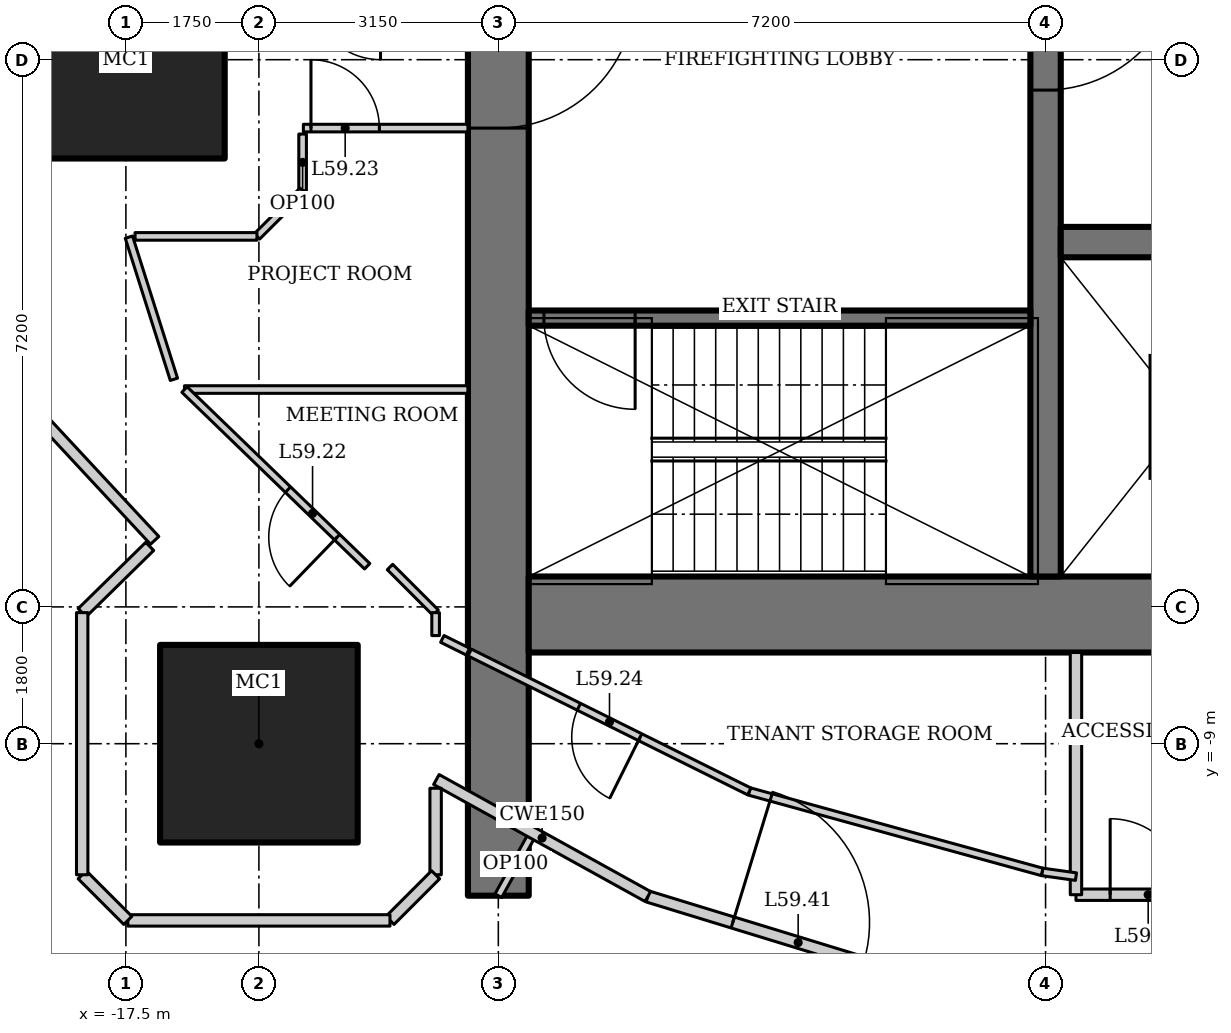
"""IFC4 building model, lengths in metres.
Left out: names, types, materials, properties, quantities, classifications, styles, units other than length and angle.
Written with IfcOpenShell. Run it as: python <this file> out.ifc"""

import sys

from ifc_helpers import new_model, si_unit, direction, frame, frame_2d, origin, origin_2d, place, context, subcontext, project, spatial, rectangle, hollow_rectangle, extrude, element, fill, save


model = new_model("IFC4")
c1 = context("Model", 3, precision=1e-05, world=origin(), true_north=direction((0.0, 1.0)))
c2 = subcontext(c1, "Body", "Model", "MODEL_VIEW")
j1 = project(units=[si_unit("LENGTHUNIT", "METRE"), si_unit("PLANEANGLEUNIT", "RADIAN")], contexts=[c1])
p1 = place(None, origin())
s1 = spatial("IfcSite", under=j1, at=p1, CompositionType="ELEMENT")
p2 = place(p1, origin())
s2 = spatial("IfcBuilding", under=s1, at=p2, CompositionType="ELEMENT")
p3 = place(p2, frame((0.0, 0.0, 253.6)))
s3 = spatial("IfcBuildingStorey", under=s2, at=p3, CompositionType="ELEMENT", Elevation=253.6)
for number, where, z_axis, x_axis in (
    (1, (-17.5, 0.0, 0.0), (0.0, 0.0, 1.0), (1.0, 0.0, 0.0)),
    (2, (-15.75, -9.0, 0.0), (0.0, 0.0, 1.0), (1.0, 0.0, 0.0)),
):
    element("IfcColumn", number, at=place(p3, frame(where, z_axis=z_axis, x_axis=x_axis)), inside=s3, PredefinedType="COLUMN", context=c2, shape_type="SweptSolid", body=[
        extrude(hollow_rectangle(XDim=2.6, YDim=2.6, WallThickness=0.13, at=origin_2d()), origin(), (0.0, 0.0, 1.0), 4.2),
    ])
p4 = place(p3, frame((-12.6, 11.0, 0.0), z_axis=(0.0, 0.0, 1.0), x_axis=(0.0, -1.0, 0.0)))
e3 = element("IfcWall", 3, at=p4, inside=s3, PredefinedType="SHEAR", context=c2, shape_type="SweptSolid", body=[
    extrude(rectangle(XDim=22.0, YDim=0.8, at=frame_2d((11.0, 0.0))), origin(), (0.0, 0.0, 1.0), 4.2),
])
p5 = place(p4, frame((10.1, 0.0, 0.0)))
e4 = element("IfcOpeningElement", 4, at=p5, cuts=e3, PredefinedType="OPENING", context=c2, shape_type="SweptSolid", body=[
    extrude(rectangle(XDim=1.8, YDim=2.1, at=frame_2d((0.9, 1.05))), frame((0.0, 0.41, 0.0), z_axis=(0.0, -1.0, 0.0), x_axis=(1.0, 0.0, 0.0)), (0.0, 0.0, 1.0), 0.82),
])
p6 = place(p3, frame((-12.2, -7.3, 0.0), z_axis=(0.0, 0.0, 1.0), x_axis=(1.0, 0.0, 0.0)))
e5 = element("IfcWall", 5, at=p6, inside=s3, PredefinedType="SHEAR", context=c2, shape_type="SweptSolid", body=[
    extrude(rectangle(XDim=24.4, YDim=1.0, at=frame_2d((12.2, 0.0))), origin(), (0.0, 0.0, 1.0), 4.2),
])
p7 = place(p3, frame((-5.4, 7.8, 0.0), z_axis=(0.0, 0.0, 1.0), x_axis=(0.0, -1.0, 0.0)))
e6 = element("IfcWall", 6, at=p7, inside=s3, PredefinedType="SHEAR", context=c2, shape_type="SweptSolid", body=[
    extrude(rectangle(XDim=14.6, YDim=0.4, at=frame_2d((7.3, 0.0))), origin(), (0.0, 0.0, 1.0), 4.2),
])
p8 = place(p7, frame((6.4, 0.0, 0.0)))
e7 = element("IfcOpeningElement", 7, at=p8, cuts=e6, PredefinedType="OPENING", context=c2, shape_type="SweptSolid", body=[
    extrude(rectangle(XDim=1.8, YDim=2.1, at=frame_2d((0.9, 1.05))), frame((0.0, 0.21, 0.0), z_axis=(0.0, -1.0, 0.0), x_axis=(1.0, 0.0, 0.0)), (0.0, 0.0, 1.0), 0.42),
])
p9 = place(p3, frame((-5.2, -2.4, 0.0), z_axis=(0.0, 0.0, 1.0), x_axis=(1.0, 0.0, 0.0)))
e8 = element("IfcWall", 8, at=p9, inside=s3, PredefinedType="SHEAR", context=c2, shape_type="SweptSolid", body=[
    extrude(rectangle(XDim=10.4, YDim=0.4, at=frame_2d((5.2, 0.0))), origin(), (0.0, 0.0, 1.0), 4.2),
])
p10 = place(p9, frame((1.683, 0.0, 0.0)))
e9 = element("IfcOpeningElement", 9, at=p10, cuts=e8, PredefinedType="OPENING", context=c2, shape_type="SweptSolid", body=[
    extrude(rectangle(XDim=1.1, YDim=2.2, at=frame_2d((0.55, 1.1))), frame((0.0, 0.21, 0.0), z_axis=(0.0, -1.0, 0.0), x_axis=(1.0, 0.0, 0.0)), (0.0, 0.0, 1.0), 0.42),
])
p11 = place(p9, frame((5.217, 0.0, 0.0)))
e10 = element("IfcOpeningElement", 10, at=p11, cuts=e8, PredefinedType="OPENING", context=c2, shape_type="SweptSolid", body=[
    extrude(rectangle(XDim=1.1, YDim=2.2, at=frame_2d((0.55, 1.1))), frame((0.0, 0.21, 0.0), z_axis=(0.0, -1.0, 0.0), x_axis=(1.0, 0.0, 0.0)), (0.0, 0.0, 1.0), 0.42),
])
p12 = place(p9, frame((8.75, 0.0, 0.0)))
e11 = element("IfcOpeningElement", 11, at=p12, cuts=e8, PredefinedType="OPENING", context=c2, shape_type="SweptSolid", body=[
    extrude(rectangle(XDim=1.1, YDim=2.2, at=frame_2d((0.55, 1.1))), frame((0.0, 0.21, 0.0), z_axis=(0.0, -1.0, 0.0), x_axis=(1.0, 0.0, 0.0)), (0.0, 0.0, 1.0), 0.42),
])
p13 = place(p3, frame((-5.6, -3.4, 0.0), z_axis=(0.0, 0.0, 1.0), x_axis=(-1.0, 0.0, 0.0)))
e12 = element("IfcWall", 12, at=p13, inside=s3, PredefinedType="SHEAR", context=c2, shape_type="SweptSolid", body=[
    extrude(rectangle(XDim=6.6, YDim=0.2, at=frame_2d((3.3, 0.0))), origin(), (0.0, 0.0, 1.0), 4.2),
])
p14 = place(p13, frame((5.2, 0.0, 0.0)))
e13 = element("IfcOpeningElement", 13, at=p14, cuts=e12, PredefinedType="OPENING", context=c2, shape_type="SweptSolid", body=[
    extrude(rectangle(XDim=1.2, YDim=2.1, at=frame_2d((0.6, 1.05))), frame((0.0, 0.11, 0.0), z_axis=(0.0, -1.0, 0.0), x_axis=(1.0, 0.0, 0.0)), (0.0, 0.0, 1.0), 0.22),
])
p15 = place(p3, frame((-10.633, -11.01, 0.0), z_axis=(0.0, 0.0, 1.0), x_axis=(0.956185837153, -0.292760388079, 0.0)))
e14 = element("IfcWall", 14, at=p15, inside=s3, PredefinedType="PARTITIONING", context=c2, shape_type="SweptSolid", body=[
    extrude(rectangle(XDim=4.544, YDim=0.15, at=frame_2d((2.272, 0.0))), origin(), (0.0, 0.0, 1.0), 4.05),
])
p16 = place(p15, frame((1.168, 0.0, 0.0)))
e15 = element("IfcOpeningElement", 15, at=p16, cuts=e14, PredefinedType="OPENING", context=c2, shape_type="SweptSolid", body=[
    extrude(rectangle(XDim=1.8, YDim=2.1, at=frame_2d((0.9, 1.05))), frame((0.0, 0.085, 0.0), z_axis=(0.0, -1.0, 0.0), x_axis=(1.0, 0.0, 0.0)), (0.0, 0.0, 1.0), 0.17),
])
p17 = place(p3, frame((-5.0, -10.987, 0.0), z_axis=(0.0, 0.0, 1.0), x_axis=(1.0, 0.0, 0.0)))
e16 = element("IfcWall", 16, at=p17, inside=s3, PredefinedType="SOLIDWALL", context=c2, shape_type="SweptSolid", body=[
    extrude(rectangle(XDim=10.0, YDim=0.15, at=frame_2d((5.0, 0.0))), origin(), (0.0, 0.0, 1.0), 4.05),
])
p18 = place(p17, frame((0.45, 0.0, 0.0)))
e17 = element("IfcOpeningElement", 17, at=p18, cuts=e16, PredefinedType="OPENING", context=c2, shape_type="SweptSolid", body=[
    extrude(rectangle(XDim=1.0, YDim=2.1, at=frame_2d((0.5, 1.05))), frame((0.0, 0.085, 0.0), z_axis=(0.0, -1.0, 0.0), x_axis=(1.0, 0.0, 0.0)), (0.0, 0.0, 1.0), 0.17),
])
p19 = place(p17, frame((3.15, 0.0, 0.0)))
e18 = element("IfcOpeningElement", 18, at=p19, cuts=e16, PredefinedType="OPENING", context=c2, shape_type="SweptSolid", body=[
    extrude(rectangle(XDim=0.9, YDim=2.1, at=frame_2d((0.45, 1.05))), frame((0.0, 0.085, 0.0), z_axis=(0.0, -1.0, 0.0), x_axis=(1.0, 0.0, 0.0)), (0.0, 0.0, 1.0), 0.17),
])
p20 = place(p17, frame((6.55, 0.0, 0.0)))
e19 = element("IfcOpeningElement", 19, at=p20, cuts=e16, PredefinedType="OPENING", context=c2, shape_type="SweptSolid", body=[
    extrude(rectangle(XDim=0.9, YDim=2.1, at=frame_2d((0.45, 1.05))), frame((0.0, 0.085, 0.0), z_axis=(0.0, -1.0, 0.0), x_axis=(1.0, 0.0, 0.0)), (0.0, 0.0, 1.0), 0.17),
])
p21 = place(p17, frame((8.95, 0.0, 0.0)))
e20 = element("IfcOpeningElement", 20, at=p21, cuts=e16, PredefinedType="OPENING", context=c2, shape_type="SweptSolid", body=[
    extrude(rectangle(XDim=0.8, YDim=2.1, at=frame_2d((0.4, 1.05))), frame((0.0, 0.085, 0.0), z_axis=(0.0, -1.0, 0.0), x_axis=(1.0, 0.0, 0.0)), (0.0, 0.0, 1.0), 0.17),
])
p22 = place(p3, frame((-5.0, -7.8, 0.0), z_axis=(0.0, 0.0, 1.0), x_axis=(0.0, -1.0, 0.0)))
e21 = element("IfcWall", 21, at=p22, inside=s3, PredefinedType="SOLIDWALL", context=c2, shape_type="SweptSolid", body=[
    extrude(rectangle(XDim=3.187, YDim=0.15, at=frame_2d((1.594, 0.0))), origin(), (0.0, 0.0, 1.0), 4.05),
])
p23 = place(p3, frame((-16.729, -4.34, 0.0), z_axis=(0.0, 0.0, 1.0), x_axis=(1.0, 0.0, 0.0)))
e22 = element("IfcWall", 22, at=p23, inside=s3, PredefinedType="PARTITIONING", context=c2, shape_type="SweptSolid", body=[
    extrude(rectangle(XDim=3.729, YDim=0.1, at=frame_2d((1.865, 0.0))), origin(), (0.0, 0.0, 1.0), 4.05),
])
p24 = place(p3, frame((-13.0, -7.788, 0.0), z_axis=(0.0, 0.0, 1.0), x_axis=(-0.895721570004, 0.444615416995, 0.0)))
e23 = element("IfcWall", 23, at=p24, inside=s3, PredefinedType="PARTITIONING", context=c2, shape_type="SweptSolid", body=[
    extrude(rectangle(XDim=0.376, YDim=0.1, at=frame_2d((0.188, 0.0))), origin(), (0.0, 0.0, 1.0), 4.05),
])
p25 = place(p3, frame((-5.0, -10.749, 0.0), z_axis=(0.0, 0.0, 1.0), x_axis=(-0.990442882696, 0.137923515463, 0.0)))
e24 = element("IfcWall", 24, at=p25, inside=s3, PredefinedType="PARTITIONING", context=c2, shape_type="SweptSolid", body=[
    extrude(rectangle(XDim=0.45, YDim=0.1, at=frame_2d((0.225, 0.0))), origin(), (0.0, 0.0, 1.0), 4.05),
])
p26 = place(p3, frame((-5.445, -10.687, 0.0), z_axis=(0.0, 0.0, 1.0), x_axis=(-0.964244438722, 0.265014456954, 0.0)))
e25 = element("IfcWall", 25, at=p26, inside=s3, PredefinedType="PARTITIONING", context=c2, shape_type="SweptSolid", body=[
    extrude(rectangle(XDim=3.995, YDim=0.1, at=frame_2d((1.998, 0.0))), origin(), (0.0, 0.0, 1.0), 4.05),
])
p27 = place(p3, frame((-9.298, -9.628, 0.0), z_axis=(0.0, 0.0, 1.0), x_axis=(-0.895529831139, 0.445001484874, 0.0)))
e26 = element("IfcWall", 26, at=p27, inside=s3, PredefinedType="PARTITIONING", context=c2, shape_type="SweptSolid", body=[
    extrude(rectangle(XDim=4.108, YDim=0.1, at=frame_2d((2.054, 0.0))), origin(), (0.0, 0.0, 1.0), 4.05),
])
p28 = place(p27, frame((1.604, 0.0, 0.0)))
e27 = element("IfcOpeningElement", 27, at=p28, cuts=e26, PredefinedType="OPENING", context=c2, shape_type="SweptSolid", body=[
    extrude(rectangle(XDim=0.9, YDim=2.1, at=frame_2d((0.45, 1.05))), frame((0.0, 0.06, 0.0), z_axis=(0.0, -1.0, 0.0), x_axis=(1.0, 0.0, 0.0)), (0.0, 0.0, 1.0), 0.12),
])
p29 = place(p3, frame((-12.6, -11.0, 0.0), z_axis=(0.0, 0.0, 1.0), x_axis=(0.484103558985, 0.875010710893, 0.0)))
e28 = element("IfcWall", 28, at=p29, inside=s3, PredefinedType="PARTITIONING", context=c2, shape_type="SweptSolid", body=[
    extrude(rectangle(XDim=0.943, YDim=0.1, at=frame_2d((0.472, 0.0))), origin(), (0.0, 0.0, 1.0), 4.05),
])
p30 = place(p3, frame((-16.868, -4.206, 0.0), z_axis=(0.0, 0.0, 1.0), x_axis=(-0.301821975729, 0.953364303384, 0.0)))
e29 = element("IfcWall", 29, at=p30, inside=s3, PredefinedType="PARTITIONING", context=c2, shape_type="SweptSolid", body=[
    extrude(rectangle(XDim=1.962, YDim=0.1, at=frame_2d((0.981, 0.0))), origin(), (0.0, 0.0, 1.0), 4.05),
])
p31 = place(p3, frame((-15.165, -0.9, 0.0), z_axis=(0.0, 0.0, 1.0), x_axis=(1.0, 0.0, 0.0)))
e30 = element("IfcWall", 30, at=p31, inside=s3, PredefinedType="PARTITIONING", context=c2, shape_type="SweptSolid", body=[
    extrude(rectangle(XDim=2.165, YDim=0.1, at=frame_2d((1.083, 0.0))), origin(), (0.0, 0.0, 1.0), 4.05),
])
p32 = place(p31, frame((0.1, 0.0, 0.0)))
e31 = element("IfcOpeningElement", 31, at=p32, cuts=e30, PredefinedType="OPENING", context=c2, shape_type="SweptSolid", body=[
    extrude(rectangle(XDim=0.9, YDim=2.1, at=frame_2d((0.45, 1.05))), frame((0.0, 0.06, 0.0), z_axis=(0.0, -1.0, 0.0), x_axis=(1.0, 0.0, 0.0)), (0.0, 0.0, 1.0), 0.12),
])
p33 = place(p3, frame((-15.175, -0.978, 0.0), z_axis=(0.0, 0.0, 1.0), x_axis=(0.0, -1.0, 0.0)))
e32 = element("IfcWall", 32, at=p33, inside=s3, PredefinedType="PARTITIONING", context=c2, shape_type="SweptSolid", body=[
    extrude(rectangle(XDim=0.746, YDim=0.1, at=frame_2d((0.373, 0.0))), origin(), (0.0, 0.0, 1.0), 4.05),
])
p34 = place(p3, frame((-15.175, -1.725, 0.0), z_axis=(0.0, 0.0, 1.0), x_axis=(-0.707106781187, -0.707106781187, 0.0)))
e33 = element("IfcWall", 33, at=p34, inside=s3, PredefinedType="PARTITIONING", context=c2, shape_type="SweptSolid", body=[
    extrude(rectangle(XDim=0.849, YDim=0.1, at=frame_2d((0.425, 0.0))), origin(), (0.0, 0.0, 1.0), 4.05),
])
p35 = place(p3, frame((-15.775, -2.325, 0.0), z_axis=(0.0, 0.0, 1.0), x_axis=(-1.0, 0.0, 0.0)))
e34 = element("IfcWall", 34, at=p35, inside=s3, PredefinedType="PARTITIONING", context=c2, shape_type="SweptSolid", body=[
    extrude(rectangle(XDim=1.604, YDim=0.1, at=frame_2d((0.802, 0.0))), origin(), (0.0, 0.0, 1.0), 4.05),
])
p36 = place(p3, frame((-18.673, -4.656, 0.0), z_axis=(0.0, 0.0, 1.0), x_axis=(0.680985069419, -0.732297299755, 0.0)))
e35 = element("IfcWall", 35, at=p36, inside=s3, PredefinedType="PARTITIONING", context=c2, shape_type="SweptSolid", body=[
    extrude(rectangle(XDim=2.279, YDim=0.15, at=frame_2d((1.14, 0.0))), origin(), (0.0, 0.0, 1.0), 4.05),
])
p37 = place(p3, frame((-13.415, -9.472, 0.0), z_axis=(0.0, 0.0, 1.0), x_axis=(0.875072100837, -0.483992580869, 0.0)))
e36 = element("IfcWall", 36, at=p37, inside=s3, PredefinedType="PARTITIONING", context=c2, shape_type="SweptSolid", body=[
    extrude(rectangle(XDim=3.179, YDim=0.15, at=frame_2d((1.59, 0.0))), origin(), (0.0, 0.0, 1.0), 4.05),
])
p38 = place(p3, frame((-14.325, -6.665, 0.0), z_axis=(0.0, 0.0, 1.0), x_axis=(-0.718798647558, 0.695218314107, 0.0)))
e37 = element("IfcWall", 37, at=p38, inside=s3, PredefinedType="PARTITIONING", context=c2, shape_type="SweptSolid", body=[
    extrude(rectangle(XDim=3.344, YDim=0.1, at=frame_2d((1.672, 0.0))), origin(), (0.0, 0.0, 1.0), 4.05),
])
p39 = place(p38, frame((0.55, 0.0, 0.0)))
e38 = element("IfcOpeningElement", 38, at=p39, cuts=e37, PredefinedType="OPENING", context=c2, shape_type="SweptSolid", body=[
    extrude(rectangle(XDim=0.9, YDim=2.1, at=frame_2d((0.45, 1.05))), frame((0.0, 0.06, 0.0), z_axis=(0.0, -1.0, 0.0), x_axis=(1.0, 0.0, 0.0)), (0.0, 0.0, 1.0), 0.12),
])
p40 = place(p3, frame((-14.025, -6.675, 0.0), z_axis=(0.0, 0.0, 1.0), x_axis=(0.707106781187, -0.707106781187, 0.0)))
e39 = element("IfcWall", 39, at=p40, inside=s3, PredefinedType="PARTITIONING", context=c2, shape_type="SweptSolid", body=[
    extrude(rectangle(XDim=0.849, YDim=0.1, at=frame_2d((0.425, 0.0))), origin(), (0.0, 0.0, 1.0), 4.05),
])
p41 = place(p3, frame((-13.425, -7.275, 0.0), z_axis=(0.0, 0.0, 1.0), x_axis=(0.0, -1.0, 0.0)))
e40 = element("IfcWall", 40, at=p41, inside=s3, PredefinedType="PARTITIONING", context=c2, shape_type="SweptSolid", body=[
    extrude(rectangle(XDim=0.302, YDim=0.1, at=frame_2d((0.151, 0.0))), origin(), (0.0, 0.0, 1.0), 4.05),
])
p42 = place(p3, frame((-18.075, -7.275, 0.0), z_axis=(0.0, 0.0, 1.0), x_axis=(0.713842064016, 0.700306723973, 0.0)))
e41 = element("IfcWall", 41, at=p42, inside=s3, PredefinedType="PARTITIONING", context=c2, shape_type="SweptSolid", body=[
    extrude(rectangle(XDim=1.245, YDim=0.15, at=frame_2d((0.622, 0.0))), origin(), (0.0, 0.0, 1.0), 4.05),
])
p43 = place(p3, frame((-13.425, -9.586, 0.0), z_axis=(0.0, 0.0, 1.0), x_axis=(0.0, -1.0, 0.0)))
e42 = element("IfcWall", 42, at=p43, inside=s3, PredefinedType="PARTITIONING", context=c2, shape_type="SweptSolid", body=[
    extrude(rectangle(XDim=1.138, YDim=0.15, at=frame_2d((0.569, 0.0))), origin(), (0.0, 0.0, 1.0), 4.05),
])
p44 = place(p3, frame((-13.425, -10.725, 0.0), z_axis=(0.0, 0.0, 1.0), x_axis=(-0.707106781187, -0.707106781187, 0.0)))
e43 = element("IfcWall", 43, at=p44, inside=s3, PredefinedType="PARTITIONING", context=c2, shape_type="SweptSolid", body=[
    extrude(rectangle(XDim=0.849, YDim=0.15, at=frame_2d((0.425, 0.0))), origin(), (0.0, 0.0, 1.0), 4.05),
])
p45 = place(p3, frame((-14.025, -11.325, 0.0), z_axis=(0.0, 0.0, 1.0), x_axis=(-1.0, 0.0, 0.0)))
e44 = element("IfcWall", 44, at=p45, inside=s3, PredefinedType="PARTITIONING", context=c2, shape_type="SweptSolid", body=[
    extrude(rectangle(XDim=3.449, YDim=0.15, at=frame_2d((1.725, 0.0))), origin(), (0.0, 0.0, 1.0), 4.05),
])
p46 = place(p3, frame((-17.475, -11.325, 0.0), z_axis=(0.0, 0.0, 1.0), x_axis=(-0.707106781187, 0.707106781187, 0.0)))
e45 = element("IfcWall", 45, at=p46, inside=s3, PredefinedType="PARTITIONING", context=c2, shape_type="SweptSolid", body=[
    extrude(rectangle(XDim=0.849, YDim=0.15, at=frame_2d((0.425, 0.0))), origin(), (0.0, 0.0, 1.0), 4.05),
])
p47 = place(p3, frame((-18.075, -10.725, 0.0), z_axis=(0.0, 0.0, 1.0), x_axis=(0.0, 1.0, 0.0)))
e46 = element("IfcWall", 46, at=p47, inside=s3, PredefinedType="PARTITIONING", context=c2, shape_type="SweptSolid", body=[
    extrude(rectangle(XDim=3.449, YDim=0.15, at=frame_2d((1.725, 0.0))), origin(), (0.0, 0.0, 1.0), 3.6),
])
p48 = place(p8, origin())
e47 = element("IfcDoor", 47, at=p48, inside=s3, OperationType="DOUBLE_DOOR_DOUBLE_SWING", PredefinedType="DOOR", context=c2, shape_type="SweptSolid", body=[
    extrude(rectangle(XDim=1.8, YDim=2.1, at=frame_2d((0.9, 1.05))), frame((0.0, 0.025, 0.0), z_axis=(0.0, -1.0, 0.0), x_axis=(1.0, 0.0, 0.0)), (0.0, 0.0, 1.0), 0.05),
])
fill(e7, e47)
p49 = place(p14, origin())
e48 = element("IfcDoor", 48, at=p49, inside=s3, OperationType="SINGLE_SWING_RIGHT", PredefinedType="DOOR", context=c2, shape_type="SweptSolid", body=[
    extrude(rectangle(XDim=1.2, YDim=2.1, at=frame_2d((0.6, 1.05))), frame((0.0, 0.025, 0.0), z_axis=(0.0, -1.0, 0.0), x_axis=(1.0, 0.0, 0.0)), (0.0, 0.0, 1.0), 0.05),
])
fill(e13, e48)
p50 = place(p5, origin())
e49 = element("IfcDoor", 49, at=p50, inside=s3, OperationType="DOUBLE_DOOR_DOUBLE_SWING", PredefinedType="DOOR", context=c2, shape_type="SweptSolid", body=[
    extrude(rectangle(XDim=1.8, YDim=2.1, at=frame_2d((0.9, 1.05))), frame((0.0, 0.025, 0.0), z_axis=(0.0, -1.0, 0.0), x_axis=(1.0, 0.0, 0.0)), (0.0, 0.0, 1.0), 0.05),
])
fill(e4, e49)
p51 = place(p18, origin())
e50 = element("IfcDoor", 50, at=p51, inside=s3, OperationType="SINGLE_SWING_LEFT", PredefinedType="DOOR", context=c2, shape_type="SweptSolid", body=[
    extrude(rectangle(XDim=1.0, YDim=2.1, at=frame_2d((0.5, 1.05))), frame((0.0, 0.025, 0.0), z_axis=(0.0, -1.0, 0.0), x_axis=(1.0, 0.0, 0.0)), (0.0, 0.0, 1.0), 0.05),
])
fill(e17, e50)
p52 = place(p39, origin())
e51 = element("IfcDoor", 51, at=p52, inside=s3, OperationType="SINGLE_SWING_LEFT", PredefinedType="DOOR", context=c2, shape_type="SweptSolid", body=[
    extrude(rectangle(XDim=0.9, YDim=2.1, at=frame_2d((0.45, 1.05))), frame((0.0, 0.025, 0.0), z_axis=(0.0, -1.0, 0.0), x_axis=(1.0, 0.0, 0.0)), (0.0, 0.0, 1.0), 0.05),
])
fill(e38, e51)
p53 = place(p32, origin())
e52 = element("IfcDoor", 52, at=p53, inside=s3, OperationType="SINGLE_SWING_LEFT", PredefinedType="DOOR", context=c2, shape_type="SweptSolid", body=[
    extrude(rectangle(XDim=0.9, YDim=2.1, at=frame_2d((0.45, 1.05))), frame((0.0, 0.025, 0.0), z_axis=(0.0, -1.0, 0.0), x_axis=(1.0, 0.0, 0.0)), (0.0, 0.0, 1.0), 0.05),
])
fill(e31, e52)
p54 = place(p28, origin())
e53 = element("IfcDoor", 53, at=p54, inside=s3, OperationType="SINGLE_SWING_LEFT", PredefinedType="DOOR", context=c2, shape_type="SweptSolid", body=[
    extrude(rectangle(XDim=0.9, YDim=2.1, at=frame_2d((0.45, 1.05))), frame((0.0, 0.025, 0.0), z_axis=(0.0, -1.0, 0.0), x_axis=(1.0, 0.0, 0.0)), (0.0, 0.0, 1.0), 0.05),
])
fill(e27, e53)
p55 = place(p16, origin())
e54 = element("IfcDoor", 54, at=p55, inside=s3, OperationType="DOUBLE_DOOR_DOUBLE_SWING", PredefinedType="DOOR", context=c2, shape_type="SweptSolid", body=[
    extrude(rectangle(XDim=1.8, YDim=2.1, at=frame_2d((0.9, 1.05))), frame((0.0, 0.025, 0.0), z_axis=(0.0, -1.0, 0.0), x_axis=(1.0, 0.0, 0.0)), (0.0, 0.0, 1.0), 0.05),
])
fill(e15, e54)
save(model, sys.argv[1])
